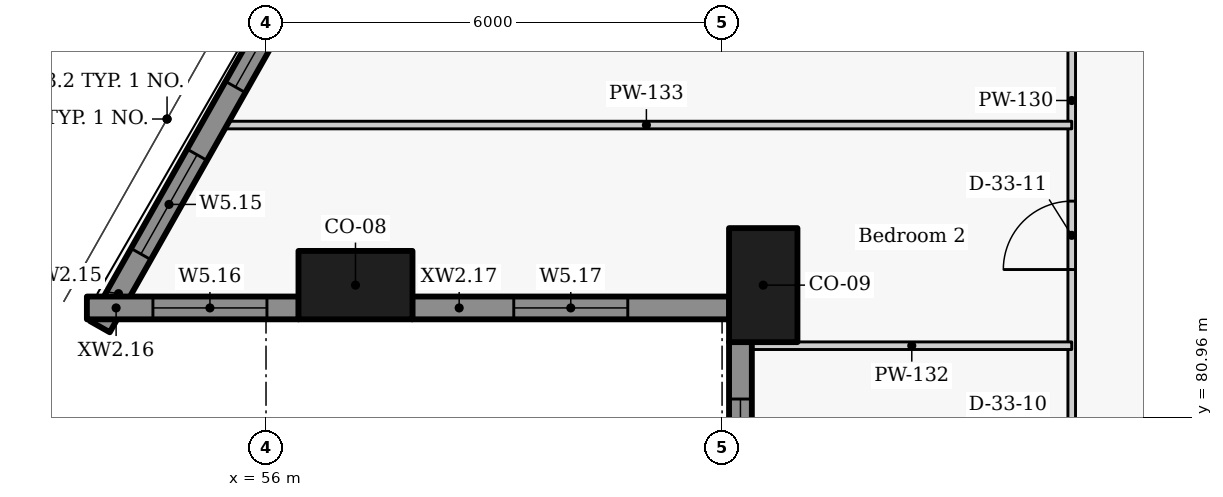
"""IFC4 building model, lengths in metres.
Left out: names, types, materials, properties, quantities, classifications, styles, units other than length and angle.
Written with IfcOpenShell. Run it as: python <this file> out.ifc"""

import sys

from ifc_helpers import new_model, si_unit, direction, frame, frame_2d, origin, origin_2d, place, context, subcontext, project, spatial, rectangle, extrude, element, fill, save


model = new_model("IFC4")
c1 = context("Model", 3, precision=1e-05, world=origin(), true_north=direction((0.0, 1.0)))
c2 = subcontext(c1, "Body", "Model", "MODEL_VIEW")
j1 = project(units=[si_unit("LENGTHUNIT", "METRE"), si_unit("PLANEANGLEUNIT", "RADIAN")], contexts=[c1])
p1 = place(None, origin())
s1 = spatial("IfcSite", under=j1, at=p1, CompositionType="ELEMENT")
p2 = place(p1, origin())
s2 = spatial("IfcBuilding", under=s1, at=p2, CompositionType="ELEMENT")
p3 = place(p2, frame((0.0, 0.0, 67.8)))
s3 = spatial("IfcBuildingStorey", under=s2, at=p3, CompositionType="ELEMENT", Elevation=67.8)
for number, where, z_axis, x_axis in (
    (1, (57.177, 82.7, 0.0), (0.0, 0.0, 1.0), (1.0, 0.0, 0.0)),
    (2, (62.542, 82.7, 0.0), (0.0, 0.0, 1.0), (0.0, -1.0, 0.0)),
):
    element("IfcColumn", number, at=place(p3, frame(where, z_axis=z_axis, x_axis=x_axis)), inside=s3, PredefinedType="COLUMN", context=c2, shape_type="SweptSolid", body=[
        extrude(rectangle(XDim=1.5, YDim=0.9, at=origin_2d()), origin(), (0.0, 0.0, 1.0), 3.3),
    ])
p4 = place(p3, frame((56.584, 87.051, 0.0), z_axis=(0.0, 0.0, 1.0), x_axis=(-0.492363204642, -0.870389840655, 0.0)))
e3 = element("IfcWall", 3, at=p4, inside=s3, PredefinedType="SOLIDWALL", context=c2, shape_type="SweptSolid", body=[
    extrude(rectangle(XDim=5.626, YDim=0.3, at=frame_2d((2.813, 0.0))), origin(), (0.0, 0.0, 1.0), 2.05),
])
p5 = place(p4, frame((0.504, 0.0, 0.9)))
e4 = element("IfcOpeningElement", 4, at=p5, cuts=e3, PredefinedType="OPENING", context=c2, shape_type="SweptSolid", body=[
    extrude(rectangle(XDim=1.5, YDim=1.1, at=frame_2d((0.75, 0.55))), frame((0.0, 0.16, 0.0), z_axis=(0.0, -1.0, 0.0), x_axis=(1.0, 0.0, 0.0)), (0.0, 0.0, 1.0), 0.32),
])
p6 = place(p4, frame((3.028, 0.0, 0.9)))
e5 = element("IfcOpeningElement", 5, at=p6, cuts=e3, PredefinedType="OPENING", context=c2, shape_type="SweptSolid", body=[
    extrude(rectangle(XDim=1.5, YDim=1.1, at=frame_2d((0.75, 0.55))), frame((0.0, 0.16, 0.0), z_axis=(0.0, -1.0, 0.0), x_axis=(1.0, 0.0, 0.0)), (0.0, 0.0, 1.0), 0.32),
])
p7 = place(p3, frame((53.643, 82.4, 0.0), z_axis=(0.0, 0.0, 1.0), x_axis=(1.0, 0.0, 0.0)))
e6 = element("IfcWall", 6, at=p7, inside=s3, PredefinedType="SOLIDWALL", context=c2, shape_type="SweptSolid", body=[
    extrude(rectangle(XDim=2.788, YDim=0.3, at=frame_2d((1.394, 0.0))), origin(), (0.0, 0.0, 1.0), 2.05),
])
p8 = place(p7, frame((0.869, 0.0, 0.9)))
e7 = element("IfcOpeningElement", 7, at=p8, cuts=e6, PredefinedType="OPENING", context=c2, shape_type="SweptSolid", body=[
    extrude(rectangle(XDim=1.5, YDim=1.1, at=frame_2d((0.75, 0.55))), frame((0.0, 0.16, 0.0), z_axis=(0.0, -1.0, 0.0), x_axis=(1.0, 0.0, 0.0)), (0.0, 0.0, 1.0), 0.32),
])
p9 = place(p3, frame((57.923, 82.4, 0.0), z_axis=(0.0, 0.0, 1.0), x_axis=(1.0, 0.0, 0.0)))
e8 = element("IfcWall", 8, at=p9, inside=s3, PredefinedType="SOLIDWALL", context=c2, shape_type="SweptSolid", body=[
    extrude(rectangle(XDim=4.173, YDim=0.3, at=frame_2d((2.086, 0.0))), origin(), (0.0, 0.0, 1.0), 2.05),
])
p10 = place(p9, frame((1.336, 0.0, 0.9)))
e9 = element("IfcOpeningElement", 9, at=p10, cuts=e8, PredefinedType="OPENING", context=c2, shape_type="SweptSolid", body=[
    extrude(rectangle(XDim=1.5, YDim=1.1, at=frame_2d((0.75, 0.55))), frame((0.0, 0.16, 0.0), z_axis=(0.0, -1.0, 0.0), x_axis=(1.0, 0.0, 0.0)), (0.0, 0.0, 1.0), 0.32),
])
p11 = place(p3, frame((62.242, 81.954, 0.0), z_axis=(0.0, 0.0, 1.0), x_axis=(0.0, -1.0, 0.0)))
e10 = element("IfcWall", 10, at=p11, inside=s3, PredefinedType="SOLIDWALL", context=c2, shape_type="SweptSolid", body=[
    extrude(rectangle(XDim=4.208, YDim=0.3, at=frame_2d((2.104, 0.0))), origin(), (0.0, 0.0, 1.0), 2.05),
])
p12 = place(p11, frame((0.752, 0.0, 0.9)))
e11 = element("IfcOpeningElement", 11, at=p12, cuts=e10, PredefinedType="OPENING", context=c2, shape_type="SweptSolid", body=[
    extrude(rectangle(XDim=1.5, YDim=1.1, at=frame_2d((0.75, 0.55))), frame((0.0, 0.16, 0.0), z_axis=(0.0, -1.0, 0.0), x_axis=(1.0, 0.0, 0.0)), (0.0, 0.0, 1.0), 0.32),
])
p13 = place(p11, frame((3.256, 0.0, 0.9)))
e12 = element("IfcOpeningElement", 12, at=p13, cuts=e10, PredefinedType="OPENING", context=c2, shape_type="SweptSolid", body=[
    extrude(rectangle(XDim=0.6, YDim=1.1, at=frame_2d((0.3, 0.55))), frame((0.0, 0.16, 0.0), z_axis=(0.0, -1.0, 0.0), x_axis=(1.0, 0.0, 0.0)), (0.0, 0.0, 1.0), 0.32),
])
p14 = place(p3, frame((66.6, 79.0, 0.0), z_axis=(0.0, 0.0, 1.0), x_axis=(0.0, 1.0, 0.0)))
e13 = element("IfcWall", 13, at=p14, inside=s3, PredefinedType="PARTITIONING", context=c2, shape_type="SweptSolid", body=[
    extrude(rectangle(XDim=10.0, YDim=0.1, at=frame_2d((5.0, 0.0))), origin(), (0.0, 0.0, 1.0), 2.95),
])
p15 = place(p14, frame((1.002, 0.0, 0.0)))
e14 = element("IfcOpeningElement", 14, at=p15, cuts=e13, PredefinedType="OPENING", context=c2, shape_type="SweptSolid", body=[
    extrude(rectangle(XDim=0.9, YDim=2.1, at=frame_2d((0.45, 1.05))), frame((0.0, 0.06, 0.0), z_axis=(0.0, -1.0, 0.0), x_axis=(1.0, 0.0, 0.0)), (0.0, 0.0, 1.0), 0.12),
])
p16 = place(p14, frame((3.905, 0.0, 0.0)))
e15 = element("IfcOpeningElement", 15, at=p16, cuts=e13, PredefinedType="OPENING", context=c2, shape_type="SweptSolid", body=[
    extrude(rectangle(XDim=0.9, YDim=2.1, at=frame_2d((0.45, 1.05))), frame((0.0, 0.06, 0.0), z_axis=(0.0, -1.0, 0.0), x_axis=(1.0, 0.0, 0.0)), (0.0, 0.0, 1.0), 0.12),
])
p17 = place(p14, frame((7.453, 0.0, 0.0)))
e16 = element("IfcOpeningElement", 16, at=p17, cuts=e13, PredefinedType="OPENING", context=c2, shape_type="SweptSolid", body=[
    extrude(rectangle(XDim=0.9, YDim=2.1, at=frame_2d((0.45, 1.05))), frame((0.0, 0.06, 0.0), z_axis=(0.0, -1.0, 0.0), x_axis=(1.0, 0.0, 0.0)), (0.0, 0.0, 1.0), 0.12),
])
p18 = place(p3, frame((62.392, 81.903, 0.0), z_axis=(0.0, 0.0, 1.0), x_axis=(1.0, 0.0, 0.0)))
e17 = element("IfcWall", 17, at=p18, inside=s3, PredefinedType="PARTITIONING", context=c2, shape_type="SweptSolid", body=[
    extrude(rectangle(XDim=4.208, YDim=0.1, at=frame_2d((2.104, 0.0))), origin(), (0.0, 0.0, 1.0), 2.03),
])
p19 = place(p3, frame((55.409, 84.806, 0.0), z_axis=(0.0, 0.0, 1.0), x_axis=(1.0, 0.0, 0.0)))
e18 = element("IfcWall", 18, at=p19, inside=s3, PredefinedType="PARTITIONING", context=c2, shape_type="SweptSolid", body=[
    extrude(rectangle(XDim=11.191, YDim=0.1, at=frame_2d((5.596, 0.0))), origin(), (0.0, 0.0, 1.0), 2.03),
])
p20 = place(p5, origin())
e19 = element("IfcWindow", 19, at=p20, inside=s3, PartitioningType="SINGLE_PANEL", PredefinedType="WINDOW", context=c2, shape_type="SweptSolid", body=[
    extrude(rectangle(XDim=1.5, YDim=1.1, at=frame_2d((0.75, 0.55))), frame((0.0, 0.03, 0.0), z_axis=(0.0, -1.0, 0.0), x_axis=(1.0, 0.0, 0.0)), (0.0, 0.0, 1.0), 0.06),
])
fill(e4, e19)
p21 = place(p6, origin())
e20 = element("IfcWindow", 20, at=p21, inside=s3, PartitioningType="SINGLE_PANEL", PredefinedType="WINDOW", context=c2, shape_type="SweptSolid", body=[
    extrude(rectangle(XDim=1.5, YDim=1.1, at=frame_2d((0.75, 0.55))), frame((0.0, 0.03, 0.0), z_axis=(0.0, -1.0, 0.0), x_axis=(1.0, 0.0, 0.0)), (0.0, 0.0, 1.0), 0.06),
])
fill(e5, e20)
p22 = place(p8, origin())
e21 = element("IfcWindow", 21, at=p22, inside=s3, PartitioningType="SINGLE_PANEL", PredefinedType="WINDOW", context=c2, shape_type="SweptSolid", body=[
    extrude(rectangle(XDim=1.5, YDim=1.1, at=frame_2d((0.75, 0.55))), frame((0.0, 0.03, 0.0), z_axis=(0.0, -1.0, 0.0), x_axis=(1.0, 0.0, 0.0)), (0.0, 0.0, 1.0), 0.06),
])
fill(e7, e21)
p23 = place(p10, origin())
e22 = element("IfcWindow", 22, at=p23, inside=s3, PartitioningType="SINGLE_PANEL", PredefinedType="WINDOW", context=c2, shape_type="SweptSolid", body=[
    extrude(rectangle(XDim=1.5, YDim=1.1, at=frame_2d((0.75, 0.55))), frame((0.0, 0.03, 0.0), z_axis=(0.0, -1.0, 0.0), x_axis=(1.0, 0.0, 0.0)), (0.0, 0.0, 1.0), 0.06),
])
fill(e9, e22)
p24 = place(p12, origin())
e23 = element("IfcWindow", 23, at=p24, inside=s3, PartitioningType="SINGLE_PANEL", PredefinedType="WINDOW", context=c2, shape_type="SweptSolid", body=[
    extrude(rectangle(XDim=1.5, YDim=1.1, at=frame_2d((0.75, 0.55))), frame((0.0, 0.03, 0.0), z_axis=(0.0, -1.0, 0.0), x_axis=(1.0, 0.0, 0.0)), (0.0, 0.0, 1.0), 0.06),
])
fill(e11, e23)
p25 = place(p16, origin())
e24 = element("IfcDoor", 24, at=p25, inside=s3, OperationType="SINGLE_SWING_LEFT", PredefinedType="DOOR", context=c2, shape_type="SweptSolid", body=[
    extrude(rectangle(XDim=0.9, YDim=2.1, at=frame_2d((0.45, 1.05))), frame((0.0, 0.025, 0.0), z_axis=(0.0, -1.0, 0.0), x_axis=(1.0, 0.0, 0.0)), (0.0, 0.0, 1.0), 0.05),
])
fill(e15, e24)
save(model, sys.argv[1])
